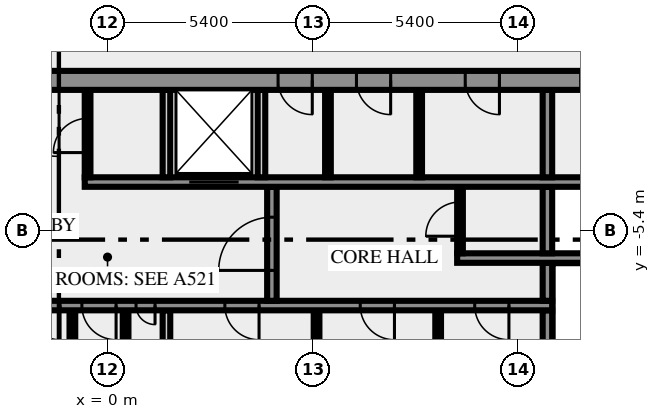
"""IFC4 building model, lengths in metres.
Left out: names, types, materials, properties, quantities, classifications, styles, units other than length and angle.
Written with IfcOpenShell. Run it as: python <this file> out.ifc"""

import sys

from ifc_helpers import new_model, si_unit, direction, frame, frame_2d, origin, place, context, subcontext, project, spatial, rectangle, extrude, element, fill, save


model = new_model("IFC4")
c1 = context("Model", 3, precision=1e-05, world=origin(), true_north=direction((0.0, 1.0)))
c2 = subcontext(c1, "Body", "Model", "MODEL_VIEW")
j1 = project(units=[si_unit("LENGTHUNIT", "METRE"), si_unit("PLANEANGLEUNIT", "RADIAN")], contexts=[c1])
p1 = place(None, origin())
s1 = spatial("IfcSite", under=j1, at=p1, CompositionType="ELEMENT")
p2 = place(p1, origin())
s2 = spatial("IfcBuilding", under=s1, at=p2, CompositionType="ELEMENT")
p3 = place(p2, frame((0.0, 0.0, 323.0)))
s3 = spatial("IfcBuildingStorey", under=s2, at=p3, CompositionType="ELEMENT", Elevation=323.0)
for number, where, z_axis, x_axis in (
    (1, (-0.925, -10.5, 0.0), (0.0, 0.0, 1.0), (0.0, 1.0, 0.0)),
    (2, (0.475, -10.5, 0.0), (0.0, 0.0, 1.0), (0.0, 1.0, 0.0)),
):
    element("IfcWall", number, at=place(p3, frame(where, z_axis=z_axis, x_axis=x_axis)), inside=s3, PredefinedType="PARTITIONING", context=c2, shape_type="SweptSolid", body=[
        extrude(rectangle(XDim=3.0, YDim=0.15, at=frame_2d((1.5, 0.0))), origin(), (0.0, 0.0, 1.0), 3.65),
    ])
p4 = place(p3, frame((1.55, -10.5, 0.0), z_axis=(0.0, 0.0, 1.0), x_axis=(0.0, 1.0, 0.0)))
e3 = element("IfcWall", 3, at=p4, inside=s3, PredefinedType="SOLIDWALL", context=c2, shape_type="SweptSolid", body=[
    extrude(rectangle(XDim=3.0, YDim=0.2, at=frame_2d((1.5, 0.0))), origin(), (0.0, 0.0, 1.0), 3.65),
])
for number, where, z_axis, x_axis in (
    (4, (5.5, -10.5, 0.0), (0.0, 0.0, 1.0), (0.0, 1.0, 0.0)),
    (5, (8.7, -10.5, 0.0), (0.0, 0.0, 1.0), (0.0, 1.0, 0.0)),
):
    element("IfcWall", number, at=place(p3, frame(where, z_axis=z_axis, x_axis=x_axis)), inside=s3, PredefinedType="PARTITIONING", context=c2, shape_type="SweptSolid", body=[
        extrude(rectangle(XDim=3.0, YDim=0.15, at=frame_2d((1.5, 0.0))), origin(), (0.0, 0.0, 1.0), 3.65),
    ])
p5 = place(p3, frame((11.575, -10.5, 0.0), z_axis=(0.0, 0.0, 1.0), x_axis=(0.0, 1.0, 0.0)))
e6 = element("IfcWall", 6, at=p5, inside=s3, PredefinedType="SHEAR", context=c2, shape_type="SweptSolid", body=[
    extrude(rectangle(XDim=3.0, YDim=0.25, at=frame_2d((1.5, 0.0))), origin(), (0.0, 0.0, 1.0), 3.65),
])
p6 = place(p3, frame((11.7, -7.375, 0.0), z_axis=(0.0, 0.0, 1.0), x_axis=(-1.0, 0.0, 0.0)))
e7 = element("IfcWall", 7, at=p6, inside=s3, PredefinedType="SHEAR", context=c2, shape_type="SweptSolid", body=[
    extrude(rectangle(XDim=23.4, YDim=0.25, at=frame_2d((11.7, 0.0))), origin(), (0.0, 0.0, 1.0), 3.65),
])
p7 = place(p6, frame((22.225, 0.0, 0.0)))
e8 = element("IfcOpeningElement", 8, at=p7, cuts=e7, PredefinedType="OPENING", context=c2, shape_type="SweptSolid", body=[
    extrude(rectangle(XDim=0.8, YDim=2.1, at=frame_2d((0.4, 1.05))), frame((0.0, 0.135, 0.0), z_axis=(0.0, -1.0, 0.0), x_axis=(1.0, 0.0, 0.0)), (0.0, 0.0, 1.0), 0.27),
])
p8 = place(p6, frame((20.2, 0.0, 0.0)))
e9 = element("IfcOpeningElement", 9, at=p8, cuts=e7, PredefinedType="OPENING", context=c2, shape_type="SweptSolid", body=[
    extrude(rectangle(XDim=1.1, YDim=2.1, at=frame_2d((0.55, 1.05))), frame((0.0, 0.135, 0.0), z_axis=(0.0, -1.0, 0.0), x_axis=(1.0, 0.0, 0.0)), (0.0, 0.0, 1.0), 0.27),
])
p9 = place(p6, frame((17.7, 0.0, 0.0)))
e10 = element("IfcOpeningElement", 10, at=p9, cuts=e7, PredefinedType="OPENING", context=c2, shape_type="SweptSolid", body=[
    extrude(rectangle(XDim=1.1, YDim=2.1, at=frame_2d((0.55, 1.05))), frame((0.0, 0.135, 0.0), z_axis=(0.0, -1.0, 0.0), x_axis=(1.0, 0.0, 0.0)), (0.0, 0.0, 1.0), 0.27),
])
p10 = place(p6, frame((15.975, 0.0, 0.0)))
e11 = element("IfcOpeningElement", 11, at=p10, cuts=e7, PredefinedType="OPENING", context=c2, shape_type="SweptSolid", body=[
    extrude(rectangle(XDim=0.8, YDim=2.1, at=frame_2d((0.4, 1.05))), frame((0.0, 0.135, 0.0), z_axis=(0.0, -1.0, 0.0), x_axis=(1.0, 0.0, 0.0)), (0.0, 0.0, 1.0), 0.27),
])
p11 = place(p6, frame((14.5, 0.0, 0.0)))
e12 = element("IfcOpeningElement", 12, at=p11, cuts=e7, PredefinedType="OPENING", context=c2, shape_type="SweptSolid", body=[
    extrude(rectangle(XDim=0.9, YDim=2.1, at=frame_2d((0.45, 1.05))), frame((0.0, 0.135, 0.0), z_axis=(0.0, -1.0, 0.0), x_axis=(1.0, 0.0, 0.0)), (0.0, 0.0, 1.0), 0.27),
])
p12 = place(p6, frame((12.95, 0.0, 0.0)))
e13 = element("IfcOpeningElement", 13, at=p12, cuts=e7, PredefinedType="OPENING", context=c2, shape_type="SweptSolid", body=[
    extrude(rectangle(XDim=0.9, YDim=2.1, at=frame_2d((0.45, 1.05))), frame((0.0, 0.135, 0.0), z_axis=(0.0, -1.0, 0.0), x_axis=(1.0, 0.0, 0.0)), (0.0, 0.0, 1.0), 0.27),
])
p13 = place(p6, frame((11.475, 0.0, 0.0)))
e14 = element("IfcOpeningElement", 14, at=p13, cuts=e7, PredefinedType="OPENING", context=c2, shape_type="SweptSolid", body=[
    extrude(rectangle(XDim=0.9, YDim=2.1, at=frame_2d((0.45, 1.05))), frame((0.0, 0.135, 0.0), z_axis=(0.0, -1.0, 0.0), x_axis=(1.0, 0.0, 0.0)), (0.0, 0.0, 1.0), 0.27),
])
p14 = place(p6, frame((10.45, 0.0, 0.0)))
e15 = element("IfcOpeningElement", 15, at=p14, cuts=e7, PredefinedType="OPENING", context=c2, shape_type="SweptSolid", body=[
    extrude(rectangle(XDim=0.5, YDim=2.1, at=frame_2d((0.25, 1.05))), frame((0.0, 0.135, 0.0), z_axis=(0.0, -1.0, 0.0), x_axis=(1.0, 0.0, 0.0)), (0.0, 0.0, 1.0), 0.27),
])
p15 = place(p6, frame((7.713, 0.0, 0.0)))
e16 = element("IfcOpeningElement", 16, at=p15, cuts=e7, PredefinedType="OPENING", context=c2, shape_type="SweptSolid", body=[
    extrude(rectangle(XDim=0.9, YDim=2.1, at=frame_2d((0.45, 1.05))), frame((0.0, 0.135, 0.0), z_axis=(0.0, -1.0, 0.0), x_axis=(1.0, 0.0, 0.0)), (0.0, 0.0, 1.0), 0.27),
])
p16 = place(p6, frame((4.15, 0.0, 0.0)))
e17 = element("IfcOpeningElement", 17, at=p16, cuts=e7, PredefinedType="OPENING", context=c2, shape_type="SweptSolid", body=[
    extrude(rectangle(XDim=0.9, YDim=2.1, at=frame_2d((0.45, 1.05))), frame((0.0, 0.135, 0.0), z_axis=(0.0, -1.0, 0.0), x_axis=(1.0, 0.0, 0.0)), (0.0, 0.0, 1.0), 0.27),
])
p17 = place(p6, frame((1.138, 0.0, 0.0)))
e18 = element("IfcOpeningElement", 18, at=p17, cuts=e7, PredefinedType="OPENING", context=c2, shape_type="SweptSolid", body=[
    extrude(rectangle(XDim=0.9, YDim=2.1, at=frame_2d((0.45, 1.05))), frame((0.0, 0.135, 0.0), z_axis=(0.0, -1.0, 0.0), x_axis=(1.0, 0.0, 0.0)), (0.0, 0.0, 1.0), 0.27),
])
p18 = place(p3, frame((4.325, -7.25, 0.0), z_axis=(0.0, 0.0, 1.0), x_axis=(0.0, 1.0, 0.0)))
e19 = element("IfcWall", 19, at=p18, inside=s3, PredefinedType="SHEAR", context=c2, shape_type="SweptSolid", body=[
    extrude(rectangle(XDim=3.0, YDim=0.25, at=frame_2d((1.5, 0.0))), origin(), (0.0, 0.0, 1.0), 3.65),
])
p19 = place(p18, frame((0.8, 0.0, 0.0)))
e20 = element("IfcOpeningElement", 20, at=p19, cuts=e19, PredefinedType="OPENING", context=c2, shape_type="SweptSolid", body=[
    extrude(rectangle(XDim=1.4, YDim=2.1, at=frame_2d((0.7, 1.05))), frame((0.0, 0.135, 0.0), z_axis=(0.0, -1.0, 0.0), x_axis=(1.0, 0.0, 0.0)), (0.0, 0.0, 1.0), 0.27),
])
p20 = place(p3, frame((11.575, -7.25, 0.0), z_axis=(0.0, 0.0, 1.0), x_axis=(0.0, 1.0, 0.0)))
e21 = element("IfcWall", 21, at=p20, inside=s3, PredefinedType="SHEAR", context=c2, shape_type="SweptSolid", body=[
    extrude(rectangle(XDim=1.0, YDim=0.25, at=frame_2d((0.5, 0.0))), origin(), (0.0, 0.0, 1.0), 3.65),
])
p21 = place(p3, frame((20.0, -6.125, 0.0), z_axis=(0.0, 0.0, 1.0), x_axis=(-1.0, 0.0, 0.0)))
e22 = element("IfcWall", 22, at=p21, inside=s3, PredefinedType="SHEAR", context=c2, shape_type="SweptSolid", body=[
    extrude(rectangle(XDim=10.8, YDim=0.25, at=frame_2d((5.4, 0.0))), origin(), (0.0, 0.0, 1.0), 3.65),
])
p22 = place(p21, frame((0.55, 0.0, 0.0)))
e23 = element("IfcOpeningElement", 23, at=p22, cuts=e22, PredefinedType="OPENING", context=c2, shape_type="SweptSolid", body=[
    extrude(rectangle(XDim=1.8, YDim=2.1, at=frame_2d((0.9, 1.05))), frame((0.0, 0.135, 0.0), z_axis=(0.0, -1.0, 0.0), x_axis=(1.0, 0.0, 0.0)), (0.0, 0.0, 1.0), 0.27),
])
p23 = place(p3, frame((9.275, -6.0, 0.0), z_axis=(0.0, 0.0, 1.0), x_axis=(0.0, 1.0, 0.0)))
e24 = element("IfcWall", 24, at=p23, inside=s3, PredefinedType="PARTITIONING", context=c2, shape_type="SweptSolid", body=[
    extrude(rectangle(XDim=1.75, YDim=0.15, at=frame_2d((0.875, 0.0))), origin(), (0.0, 0.0, 1.0), 3.65),
])
p24 = place(p23, frame((0.45, 0.0, 0.0)))
e25 = element("IfcOpeningElement", 25, at=p24, cuts=e24, PredefinedType="OPENING", context=c2, shape_type="SweptSolid", body=[
    extrude(rectangle(XDim=0.9, YDim=2.1, at=frame_2d((0.45, 1.05))), frame((0.0, 0.085, 0.0), z_axis=(0.0, -1.0, 0.0), x_axis=(1.0, 0.0, 0.0)), (0.0, 0.0, 1.0), 0.17),
])
p25 = place(p3, frame((11.575, -6.0, 0.0), z_axis=(0.0, 0.0, 1.0), x_axis=(0.0, 1.0, 0.0)))
e26 = element("IfcWall", 26, at=p25, inside=s3, PredefinedType="SHEAR", context=c2, shape_type="SweptSolid", body=[
    extrude(rectangle(XDim=1.75, YDim=0.25, at=frame_2d((0.875, 0.0))), origin(), (0.0, 0.0, 1.0), 3.65),
])
p26 = place(p3, frame((-0.6, -4.125, 0.0), z_axis=(0.0, 0.0, 1.0), x_axis=(1.0, 0.0, 0.0)))
e27 = element("IfcWall", 27, at=p26, inside=s3, PredefinedType="SHEAR", context=c2, shape_type="SweptSolid", body=[
    extrude(rectangle(XDim=14.95, YDim=0.25, at=frame_2d((7.475, 0.0))), origin(), (0.0, 0.0, 1.0), 3.65),
])
p27 = place(p26, frame((2.75, 0.0, 0.0)))
e28 = element("IfcOpeningElement", 28, at=p27, cuts=e27, PredefinedType="OPENING", context=c2, shape_type="SweptSolid", body=[
    extrude(rectangle(XDim=1.3, YDim=2.1, at=frame_2d((0.65, 1.05))), frame((0.0, 0.135, 0.0), z_axis=(0.0, -1.0, 0.0), x_axis=(1.0, 0.0, 0.0)), (0.0, 0.0, 1.0), 0.27),
])
p28 = place(p3, frame((-0.525, -4.0, 0.0), z_axis=(0.0, 0.0, 1.0), x_axis=(0.0, 1.0, 0.0)))
e29 = element("IfcWall", 29, at=p28, inside=s3, PredefinedType="PARTITIONING", context=c2, shape_type="SweptSolid", body=[
    extrude(rectangle(XDim=2.3, YDim=0.15, at=frame_2d((1.15, 0.0))), origin(), (0.0, 0.0, 1.0), 3.65),
])
p29 = place(p28, frame((0.65, 0.0, 0.0)))
e30 = element("IfcOpeningElement", 30, at=p29, cuts=e29, PredefinedType="OPENING", context=c2, shape_type="SweptSolid", body=[
    extrude(rectangle(XDim=0.9, YDim=2.1, at=frame_2d((0.45, 1.05))), frame((0.0, 0.085, 0.0), z_axis=(0.0, -1.0, 0.0), x_axis=(1.0, 0.0, 0.0)), (0.0, 0.0, 1.0), 0.17),
])
for number, where, z_axis, x_axis in (
    (31, (1.55, -4.0, 0.0), (0.0, 0.0, 1.0), (0.0, 1.0, 0.0)),
    (32, (4.05, -4.0, 0.0), (0.0, 0.0, 1.0), (0.0, 1.0, 0.0)),
):
    element("IfcWall", number, at=place(p3, frame(where, z_axis=z_axis, x_axis=x_axis)), inside=s3, PredefinedType="SOLIDWALL", context=c2, shape_type="SweptSolid", body=[
        extrude(rectangle(XDim=2.3, YDim=0.2, at=frame_2d((1.15, 0.0))), origin(), (0.0, 0.0, 1.0), 3.65),
    ])
for number, where, z_axis, x_axis in (
    (33, (5.8, -4.0, 0.0), (0.0, 0.0, 1.0), (0.0, 1.0, 0.0)),
    (34, (8.2, -4.0, 0.0), (0.0, 0.0, 1.0), (0.0, 1.0, 0.0)),
):
    element("IfcWall", number, at=place(p3, frame(where, z_axis=z_axis, x_axis=x_axis)), inside=s3, PredefinedType="PARTITIONING", context=c2, shape_type="SweptSolid", body=[
        extrude(rectangle(XDim=2.3, YDim=0.15, at=frame_2d((1.15, 0.0))), origin(), (0.0, 0.0, 1.0), 3.65),
    ])
p30 = place(p3, frame((11.575, -4.0, 0.0), z_axis=(0.0, 0.0, 1.0), x_axis=(0.0, 1.0, 0.0)))
e35 = element("IfcWall", 35, at=p30, inside=s3, PredefinedType="SHEAR", context=c2, shape_type="SweptSolid", body=[
    extrude(rectangle(XDim=2.3, YDim=0.25, at=frame_2d((1.15, 0.0))), origin(), (0.0, 0.0, 1.0), 3.65),
])
p31 = place(p3, frame((20.49, -1.45, 0.0), z_axis=(0.0, 0.0, 1.0), x_axis=(-1.0, 0.0, 0.0)))
e36 = element("IfcWall", 36, at=p31, inside=s3, PredefinedType="SHEAR", context=c2, shape_type="SweptSolid", body=[
    extrude(rectangle(XDim=40.98, YDim=0.5, at=frame_2d((20.49, 0.0))), origin(), (0.0, 0.0, 1.0), 3.65),
])
p32 = place(p31, frame((38.14, 0.0, 0.0)))
e37 = element("IfcOpeningElement", 37, at=p32, cuts=e36, PredefinedType="OPENING", context=c2, shape_type="SweptSolid", body=[
    extrude(rectangle(XDim=1.8, YDim=2.1, at=frame_2d((0.9, 1.05))), frame((0.0, 0.26, 0.0), z_axis=(0.0, -1.0, 0.0), x_axis=(1.0, 0.0, 0.0)), (0.0, 0.0, 1.0), 0.52),
])
p33 = place(p31, frame((35.89, 0.0, 0.0)))
e38 = element("IfcOpeningElement", 38, at=p33, cuts=e36, PredefinedType="OPENING", context=c2, shape_type="SweptSolid", body=[
    extrude(rectangle(XDim=0.9, YDim=2.1, at=frame_2d((0.45, 1.05))), frame((0.0, 0.26, 0.0), z_axis=(0.0, -1.0, 0.0), x_axis=(1.0, 0.0, 0.0)), (0.0, 0.0, 1.0), 0.52),
])
p34 = place(p31, frame((32.94, 0.0, 0.0)))
e39 = element("IfcOpeningElement", 39, at=p34, cuts=e36, PredefinedType="OPENING", context=c2, shape_type="SweptSolid", body=[
    extrude(rectangle(XDim=0.9, YDim=2.1, at=frame_2d((0.45, 1.05))), frame((0.0, 0.26, 0.0), z_axis=(0.0, -1.0, 0.0), x_axis=(1.0, 0.0, 0.0)), (0.0, 0.0, 1.0), 0.52),
])
p35 = place(p31, frame((31.015, 0.0, 0.0)))
e40 = element("IfcOpeningElement", 40, at=p35, cuts=e36, PredefinedType="OPENING", context=c2, shape_type="SweptSolid", body=[
    extrude(rectangle(XDim=0.8, YDim=2.1, at=frame_2d((0.4, 1.05))), frame((0.0, 0.26, 0.0), z_axis=(0.0, -1.0, 0.0), x_axis=(1.0, 0.0, 0.0)), (0.0, 0.0, 1.0), 0.52),
])
p36 = place(p31, frame((24.765, 0.0, 0.0)))
e41 = element("IfcOpeningElement", 41, at=p36, cuts=e36, PredefinedType="OPENING", context=c2, shape_type="SweptSolid", body=[
    extrude(rectangle(XDim=0.8, YDim=2.1, at=frame_2d((0.4, 1.05))), frame((0.0, 0.26, 0.0), z_axis=(0.0, -1.0, 0.0), x_axis=(1.0, 0.0, 0.0)), (0.0, 0.0, 1.0), 0.52),
])
p37 = place(p31, frame((21.765, 0.0, 0.0)))
e42 = element("IfcOpeningElement", 42, at=p37, cuts=e36, PredefinedType="OPENING", context=c2, shape_type="SweptSolid", body=[
    extrude(rectangle(XDim=2.0, YDim=2.1, at=frame_2d((1.0, 1.05))), frame((0.0, 0.26, 0.0), z_axis=(0.0, -1.0, 0.0), x_axis=(1.0, 0.0, 0.0)), (0.0, 0.0, 1.0), 0.52),
])
p38 = place(p31, frame((15.103, 0.0, 0.0)))
e43 = element("IfcOpeningElement", 43, at=p38, cuts=e36, PredefinedType="OPENING", context=c2, shape_type="SweptSolid", body=[
    extrude(rectangle(XDim=0.9, YDim=2.1, at=frame_2d((0.45, 1.05))), frame((0.0, 0.26, 0.0), z_axis=(0.0, -1.0, 0.0), x_axis=(1.0, 0.0, 0.0)), (0.0, 0.0, 1.0), 0.52),
])
p39 = place(p31, frame((13.04, 0.0, 0.0)))
e44 = element("IfcOpeningElement", 44, at=p39, cuts=e36, PredefinedType="OPENING", context=c2, shape_type="SweptSolid", body=[
    extrude(rectangle(XDim=0.9, YDim=2.1, at=frame_2d((0.45, 1.05))), frame((0.0, 0.26, 0.0), z_axis=(0.0, -1.0, 0.0), x_axis=(1.0, 0.0, 0.0)), (0.0, 0.0, 1.0), 0.52),
])
p40 = place(p31, frame((10.177, 0.0, 0.0)))
e45 = element("IfcOpeningElement", 45, at=p40, cuts=e36, PredefinedType="OPENING", context=c2, shape_type="SweptSolid", body=[
    extrude(rectangle(XDim=0.9, YDim=2.1, at=frame_2d((0.45, 1.05))), frame((0.0, 0.26, 0.0), z_axis=(0.0, -1.0, 0.0), x_axis=(1.0, 0.0, 0.0)), (0.0, 0.0, 1.0), 0.52),
])
p41 = place(p31, frame((7.14, 0.0, 0.0)))
e46 = element("IfcOpeningElement", 46, at=p41, cuts=e36, PredefinedType="OPENING", context=c2, shape_type="SweptSolid", body=[
    extrude(rectangle(XDim=0.9, YDim=2.1, at=frame_2d((0.45, 1.05))), frame((0.0, 0.26, 0.0), z_axis=(0.0, -1.0, 0.0), x_axis=(1.0, 0.0, 0.0)), (0.0, 0.0, 1.0), 0.52),
])
p42 = place(p31, frame((5.028, 0.0, 0.0)))
e47 = element("IfcOpeningElement", 47, at=p42, cuts=e36, PredefinedType="OPENING", context=c2, shape_type="SweptSolid", body=[
    extrude(rectangle(XDim=0.8, YDim=2.1, at=frame_2d((0.4, 1.05))), frame((0.0, 0.26, 0.0), z_axis=(0.0, -1.0, 0.0), x_axis=(1.0, 0.0, 0.0)), (0.0, 0.0, 1.0), 0.52),
])
p43 = place(p31, frame((3.452, 0.0, 0.0)))
e48 = element("IfcOpeningElement", 48, at=p43, cuts=e36, PredefinedType="OPENING", context=c2, shape_type="SweptSolid", body=[
    extrude(rectangle(XDim=0.8, YDim=2.1, at=frame_2d((0.4, 1.05))), frame((0.0, 0.26, 0.0), z_axis=(0.0, -1.0, 0.0), x_axis=(1.0, 0.0, 0.0)), (0.0, 0.0, 1.0), 0.52),
])
p44 = place(p31, frame((1.04, 0.0, 0.0)))
e49 = element("IfcOpeningElement", 49, at=p44, cuts=e36, PredefinedType="OPENING", context=c2, shape_type="SweptSolid", body=[
    extrude(rectangle(XDim=1.8, YDim=2.1, at=frame_2d((0.9, 1.05))), frame((0.0, 0.26, 0.0), z_axis=(0.0, -1.0, 0.0), x_axis=(1.0, 0.0, 0.0)), (0.0, 0.0, 1.0), 0.52),
])
p45 = place(p12, origin())
e50 = element("IfcDoor", 50, at=p45, inside=s3, OperationType="SINGLE_SWING_RIGHT", PredefinedType="DOOR", context=c2, shape_type="SweptSolid", body=[
    extrude(rectangle(XDim=0.9, YDim=2.1, at=frame_2d((0.45, 1.05))), frame((0.0, 0.025, 0.0), z_axis=(0.0, -1.0, 0.0), x_axis=(1.0, 0.0, 0.0)), (0.0, 0.0, 1.0), 0.05),
])
fill(e13, e50)
p46 = place(p13, origin())
e51 = element("IfcDoor", 51, at=p46, inside=s3, OperationType="SINGLE_SWING_RIGHT", PredefinedType="DOOR", context=c2, shape_type="SweptSolid", body=[
    extrude(rectangle(XDim=0.9, YDim=2.1, at=frame_2d((0.45, 1.05))), frame((0.0, 0.025, 0.0), z_axis=(0.0, -1.0, 0.0), x_axis=(1.0, 0.0, 0.0)), (0.0, 0.0, 1.0), 0.05),
])
fill(e14, e51)
p47 = place(p14, origin())
e52 = element("IfcDoor", 52, at=p47, inside=s3, OperationType="SINGLE_SWING_LEFT", PredefinedType="DOOR", context=c2, shape_type="SweptSolid", body=[
    extrude(rectangle(XDim=0.5, YDim=2.1, at=frame_2d((0.25, 1.05))), frame((0.0, 0.025, 0.0), z_axis=(0.0, -1.0, 0.0), x_axis=(1.0, 0.0, 0.0)), (0.0, 0.0, 1.0), 0.05),
])
fill(e15, e52)
p48 = place(p15, origin())
e53 = element("IfcDoor", 53, at=p48, inside=s3, OperationType="SINGLE_SWING_LEFT", PredefinedType="DOOR", context=c2, shape_type="SweptSolid", body=[
    extrude(rectangle(XDim=0.9, YDim=2.1, at=frame_2d((0.45, 1.05))), frame((0.0, 0.025, 0.0), z_axis=(0.0, -1.0, 0.0), x_axis=(1.0, 0.0, 0.0)), (0.0, 0.0, 1.0), 0.05),
])
fill(e16, e53)
p49 = place(p16, origin())
e54 = element("IfcDoor", 54, at=p49, inside=s3, OperationType="SINGLE_SWING_LEFT", PredefinedType="DOOR", context=c2, shape_type="SweptSolid", body=[
    extrude(rectangle(XDim=0.9, YDim=2.1, at=frame_2d((0.45, 1.05))), frame((0.0, 0.025, 0.0), z_axis=(0.0, -1.0, 0.0), x_axis=(1.0, 0.0, 0.0)), (0.0, 0.0, 1.0), 0.05),
])
fill(e17, e54)
p50 = place(p17, origin())
e55 = element("IfcDoor", 55, at=p50, inside=s3, OperationType="SINGLE_SWING_LEFT", PredefinedType="DOOR", context=c2, shape_type="SweptSolid", body=[
    extrude(rectangle(XDim=0.9, YDim=2.1, at=frame_2d((0.45, 1.05))), frame((0.0, 0.025, 0.0), z_axis=(0.0, -1.0, 0.0), x_axis=(1.0, 0.0, 0.0)), (0.0, 0.0, 1.0), 0.05),
])
fill(e18, e55)
p51 = place(p19, origin())
e56 = element("IfcDoor", 56, at=p51, inside=s3, OperationType="DOUBLE_DOOR_SINGLE_SWING", PredefinedType="DOOR", context=c2, shape_type="SweptSolid", body=[
    extrude(rectangle(XDim=1.4, YDim=2.1, at=frame_2d((0.7, 1.05))), frame((0.0, 0.025, 0.0), z_axis=(0.0, -1.0, 0.0), x_axis=(1.0, 0.0, 0.0)), (0.0, 0.0, 1.0), 0.05),
])
fill(e20, e56)
p52 = place(p24, origin())
e57 = element("IfcDoor", 57, at=p52, inside=s3, OperationType="SINGLE_SWING_RIGHT", PredefinedType="DOOR", context=c2, shape_type="SweptSolid", body=[
    extrude(rectangle(XDim=0.9, YDim=2.1, at=frame_2d((0.45, 1.05))), frame((0.0, 0.025, 0.0), z_axis=(0.0, -1.0, 0.0), x_axis=(1.0, 0.0, 0.0)), (0.0, 0.0, 1.0), 0.05),
])
fill(e25, e57)
p53 = place(p27, origin())
e58 = element("IfcDoor", 58, at=p53, inside=s3, OperationType="DOUBLE_DOOR_SLIDING", PredefinedType="DOOR", context=c2, shape_type="SweptSolid", body=[
    extrude(rectangle(XDim=1.3, YDim=2.1, at=frame_2d((0.65, 1.05))), frame((0.0, 0.025, 0.0), z_axis=(0.0, -1.0, 0.0), x_axis=(1.0, 0.0, 0.0)), (0.0, 0.0, 1.0), 0.05),
])
fill(e28, e58)
p54 = place(p29, origin())
e59 = element("IfcDoor", 59, at=p54, inside=s3, OperationType="SINGLE_SWING_LEFT", PredefinedType="DOOR", context=c2, shape_type="SweptSolid", body=[
    extrude(rectangle(XDim=0.9, YDim=2.1, at=frame_2d((0.45, 1.05))), frame((0.0, 0.025, 0.0), z_axis=(0.0, -1.0, 0.0), x_axis=(1.0, 0.0, 0.0)), (0.0, 0.0, 1.0), 0.05),
])
fill(e30, e59)
p55 = place(p37, origin())
e60 = element("IfcDoor", 60, at=p55, inside=s3, OperationType="DOUBLE_DOOR_SINGLE_SWING", PredefinedType="DOOR", context=c2, shape_type="SweptSolid", body=[
    extrude(rectangle(XDim=2.0, YDim=2.1, at=frame_2d((1.0, 1.05))), frame((0.0, 0.025, 0.0), z_axis=(0.0, -1.0, 0.0), x_axis=(1.0, 0.0, 0.0)), (0.0, 0.0, 1.0), 0.05),
])
fill(e42, e60)
p56 = place(p38, origin())
e61 = element("IfcDoor", 61, at=p56, inside=s3, OperationType="SINGLE_SWING_LEFT", PredefinedType="DOOR", context=c2, shape_type="SweptSolid", body=[
    extrude(rectangle(XDim=0.9, YDim=2.1, at=frame_2d((0.45, 1.05))), frame((0.0, 0.025, 0.0), z_axis=(0.0, -1.0, 0.0), x_axis=(1.0, 0.0, 0.0)), (0.0, 0.0, 1.0), 0.05),
])
fill(e43, e61)
p57 = place(p39, origin())
e62 = element("IfcDoor", 62, at=p57, inside=s3, OperationType="SINGLE_SWING_LEFT", PredefinedType="DOOR", context=c2, shape_type="SweptSolid", body=[
    extrude(rectangle(XDim=0.9, YDim=2.1, at=frame_2d((0.45, 1.05))), frame((0.0, 0.025, 0.0), z_axis=(0.0, -1.0, 0.0), x_axis=(1.0, 0.0, 0.0)), (0.0, 0.0, 1.0), 0.05),
])
fill(e44, e62)
p58 = place(p40, origin())
e63 = element("IfcDoor", 63, at=p58, inside=s3, OperationType="SINGLE_SWING_LEFT", PredefinedType="DOOR", context=c2, shape_type="SweptSolid", body=[
    extrude(rectangle(XDim=0.9, YDim=2.1, at=frame_2d((0.45, 1.05))), frame((0.0, 0.025, 0.0), z_axis=(0.0, -1.0, 0.0), x_axis=(1.0, 0.0, 0.0)), (0.0, 0.0, 1.0), 0.05),
])
fill(e45, e63)
save(model, sys.argv[1])
